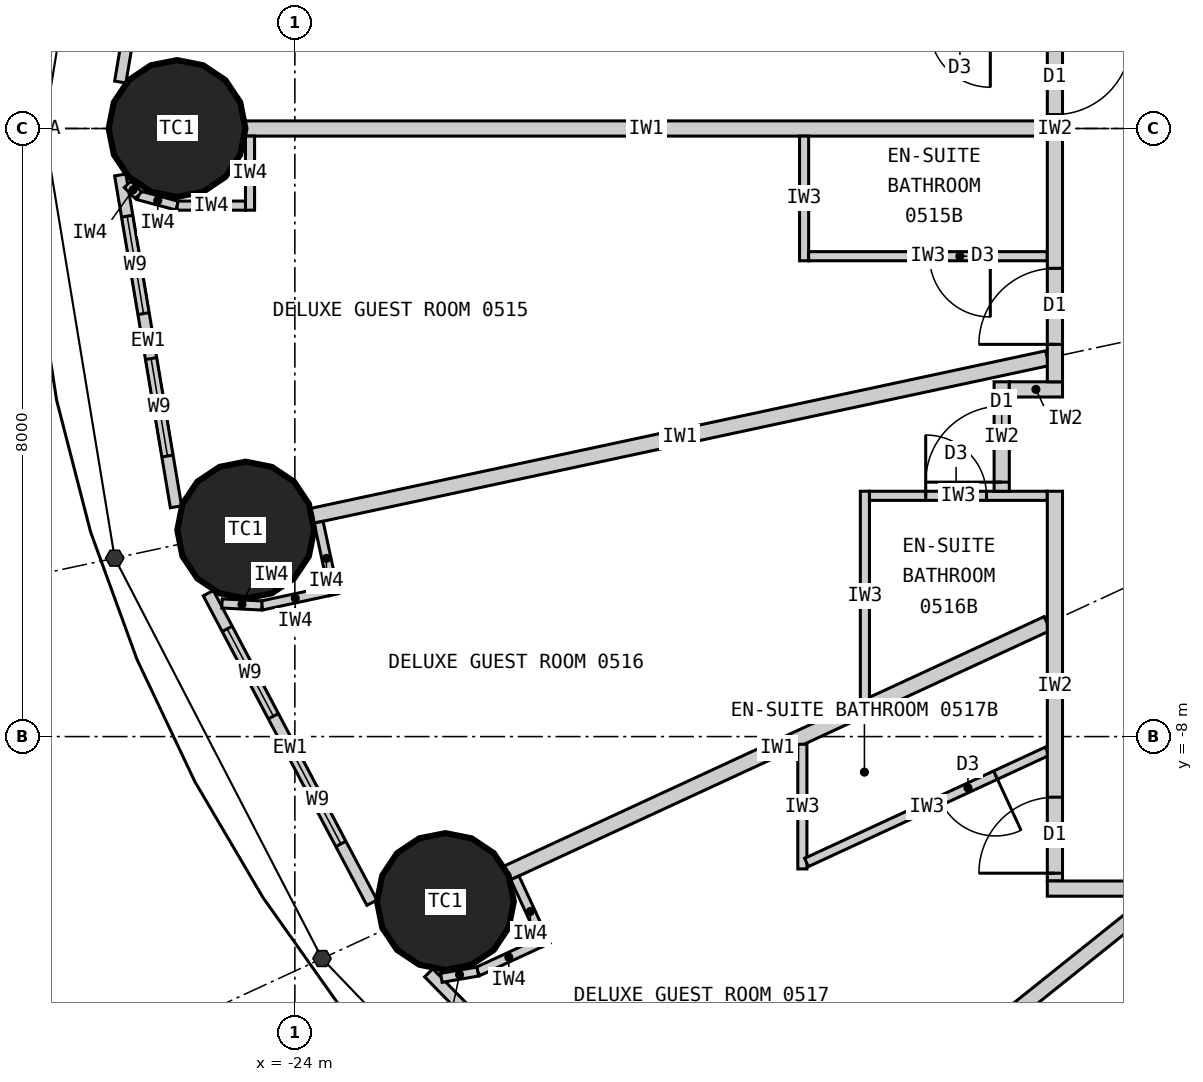
"""IFC4 building model, lengths in metres.
Left out: names, types, materials, properties, quantities, classifications, styles, units other than length and angle.
Written with IfcOpenShell. Run it as: python <this file> out.ifc"""

import sys

from ifc_helpers import new_model, si_unit, direction, frame, frame_2d, origin, origin_2d, place, context, subcontext, project, spatial, rectangle, circle, extrude, element, fill, save


model = new_model("IFC4")
c1 = context("Model", 3, precision=1e-05, world=origin(), true_north=direction((0.0, 1.0)))
c2 = subcontext(c1, "Body", "Model", "MODEL_VIEW")
j1 = project(units=[si_unit("LENGTHUNIT", "METRE"), si_unit("PLANEANGLEUNIT", "RADIAN")], contexts=[c1])
p1 = place(None, origin())
s1 = spatial("IfcSite", under=j1, at=p1, CompositionType="ELEMENT")
p2 = place(p1, origin())
s2 = spatial("IfcBuilding", under=s1, at=p2, CompositionType="ELEMENT")
p3 = place(p2, frame((0.0, 0.0, 29.4)))
s3 = spatial("IfcBuildingStorey", under=s2, at=p3, CompositionType="ELEMENT", Elevation=29.4)
for number, where, z_axis, x_axis in (
    (1, (-25.55, 0.0, 0.0), (0.0, 0.0, 1.0), (1.0, 0.0, 0.0)),
    (2, (-24.647, -5.283, 0.0), (0.0, 0.0, 1.0), (1.0, 0.0, 0.0)),
    (3, (-22.019, -10.17, 0.0), (0.0, 0.0, 1.0), (1.0, 0.0, 0.0)),
):
    element("IfcColumn", number, at=place(p3, frame(where, z_axis=z_axis, x_axis=x_axis)), inside=s3, PredefinedType="COLUMN", context=c2, shape_type="SweptSolid", body=[
        extrude(circle(Radius=0.9, at=origin_2d()), origin(), (0.0, 0.0, 1.0), 3.3),
    ])
p4 = place(p3, frame((-25.564, 4.978, 0.0), z_axis=(0.0, 0.0, 1.0), x_axis=(-0.165641751141, -0.986185991727, 0.0)))
e4 = element("IfcWall", 4, at=p4, inside=s3, PredefinedType="ELEMENTEDWALL", context=c2, shape_type="SweptSolid", body=[
    extrude(rectangle(XDim=4.428, YDim=0.15, at=frame_2d((2.214, 0.0))), origin(), (0.0, 0.0, 1.0), 3.12),
])
p5 = place(p4, frame((0.678, 0.0, 0.9)))
e5 = element("IfcOpeningElement", 5, at=p5, cuts=e4, PredefinedType="OPENING", context=c2, shape_type="SweptSolid", body=[
    extrude(rectangle(XDim=1.3, YDim=1.9, at=frame_2d((0.65, 0.95))), frame((0.0, 0.085, 0.0), z_axis=(0.0, -1.0, 0.0), x_axis=(1.0, 0.0, 0.0)), (0.0, 0.0, 1.0), 0.17),
])
p6 = place(p4, frame((2.578, 0.0, 0.9)))
e6 = element("IfcOpeningElement", 6, at=p6, cuts=e4, PredefinedType="OPENING", context=c2, shape_type="SweptSolid", body=[
    extrude(rectangle(XDim=1.3, YDim=1.9, at=frame_2d((0.65, 0.95))), frame((0.0, 0.085, 0.0), z_axis=(0.0, -1.0, 0.0), x_axis=(1.0, 0.0, 0.0)), (0.0, 0.0, 1.0), 0.17),
])
p7 = place(p3, frame((-26.297, -0.611, 0.0), z_axis=(0.0, 0.0, 1.0), x_axis=(0.165641751141, -0.986185991727, 0.0)))
e7 = element("IfcWall", 7, at=p7, inside=s3, PredefinedType="ELEMENTEDWALL", context=c2, shape_type="SweptSolid", body=[
    extrude(rectangle(XDim=4.428, YDim=0.15, at=frame_2d((2.214, 0.0))), origin(), (0.0, 0.0, 1.0), 3.12),
])
p8 = place(p7, frame((0.55, 0.0, 0.9)))
e8 = element("IfcOpeningElement", 8, at=p8, cuts=e7, PredefinedType="OPENING", context=c2, shape_type="SweptSolid", body=[
    extrude(rectangle(XDim=1.3, YDim=1.9, at=frame_2d((0.65, 0.95))), frame((0.0, 0.085, 0.0), z_axis=(0.0, -1.0, 0.0), x_axis=(1.0, 0.0, 0.0)), (0.0, 0.0, 1.0), 0.17),
])
p9 = place(p7, frame((2.45, 0.0, 0.9)))
e9 = element("IfcOpeningElement", 9, at=p9, cuts=e7, PredefinedType="OPENING", context=c2, shape_type="SweptSolid", body=[
    extrude(rectangle(XDim=1.3, YDim=1.9, at=frame_2d((0.65, 0.95))), frame((0.0, 0.085, 0.0), z_axis=(0.0, -1.0, 0.0), x_axis=(1.0, 0.0, 0.0)), (0.0, 0.0, 1.0), 0.17),
])
p10 = place(p3, frame((-25.139, -6.113, 0.0), z_axis=(0.0, 0.0, 1.0), x_axis=(0.467303182954, -0.884097129959, 0.0)))
e10 = element("IfcWall", 10, at=p10, inside=s3, PredefinedType="ELEMENTEDWALL", context=c2, shape_type="SweptSolid", body=[
    extrude(rectangle(XDim=4.606, YDim=0.15, at=frame_2d((2.303, 0.0))), origin(), (0.0, 0.0, 1.0), 3.12),
])
p11 = place(p10, frame((0.531, 0.0, 0.9)))
e11 = element("IfcOpeningElement", 11, at=p11, cuts=e10, PredefinedType="OPENING", context=c2, shape_type="SweptSolid", body=[
    extrude(rectangle(XDim=1.3, YDim=1.9, at=frame_2d((0.65, 0.95))), frame((0.0, 0.085, 0.0), z_axis=(0.0, -1.0, 0.0), x_axis=(1.0, 0.0, 0.0)), (0.0, 0.0, 1.0), 0.17),
])
p12 = place(p10, frame((2.432, 0.0, 0.9)))
e12 = element("IfcOpeningElement", 12, at=p12, cuts=e10, PredefinedType="OPENING", context=c2, shape_type="SweptSolid", body=[
    extrude(rectangle(XDim=1.3, YDim=1.9, at=frame_2d((0.65, 0.95))), frame((0.0, 0.085, 0.0), z_axis=(0.0, -1.0, 0.0), x_axis=(1.0, 0.0, 0.0)), (0.0, 0.0, 1.0), 0.17),
])
p13 = place(p3, frame((-22.239, -11.108, 0.0), z_axis=(0.0, 0.0, 1.0), x_axis=(0.699612594083, -0.714522370679, 0.0)))
e13 = element("IfcWall", 13, at=p13, inside=s3, PredefinedType="ELEMENTEDWALL", context=c2, shape_type="SweptSolid", body=[
    extrude(rectangle(XDim=4.896, YDim=0.15, at=frame_2d((2.448, 0.0))), origin(), (0.0, 0.0, 1.0), 3.12),
])
p14 = place(p13, frame((0.619, 0.0, 0.9)))
e14 = element("IfcOpeningElement", 14, at=p14, cuts=e13, PredefinedType="OPENING", context=c2, shape_type="SweptSolid", body=[
    extrude(rectangle(XDim=1.3, YDim=1.9, at=frame_2d((0.65, 0.95))), frame((0.0, 0.085, 0.0), z_axis=(0.0, -1.0, 0.0), x_axis=(1.0, 0.0, 0.0)), (0.0, 0.0, 1.0), 0.17),
])
p15 = place(p13, frame((2.519, 0.0, 0.9)))
e15 = element("IfcOpeningElement", 15, at=p15, cuts=e13, PredefinedType="OPENING", context=c2, shape_type="SweptSolid", body=[
    extrude(rectangle(XDim=1.3, YDim=1.9, at=frame_2d((0.65, 0.95))), frame((0.0, 0.085, 0.0), z_axis=(0.0, -1.0, 0.0), x_axis=(1.0, 0.0, 0.0)), (0.0, 0.0, 1.0), 0.17),
])
p16 = place(p3, frame((-14.1, 0.0, 0.0), z_axis=(0.0, 0.0, 1.0), x_axis=(-1.0, 0.0, 0.0)))
e16 = element("IfcWall", 16, at=p16, inside=s3, PredefinedType="PARTITIONING", context=c2, shape_type="SweptSolid", body=[
    extrude(rectangle(XDim=10.55, YDim=0.2, at=frame_2d((5.275, 0.0))), origin(), (0.0, 0.0, 1.0), 2.27),
])
p17 = place(p3, frame((-14.1, -3.022, 0.0), z_axis=(0.0, 0.0, 1.0), x_axis=(-0.977786510688, -0.209603290805, 0.0)))
e17 = element("IfcWall", 17, at=p17, inside=s3, PredefinedType="PARTITIONING", context=c2, shape_type="SweptSolid", body=[
    extrude(rectangle(XDim=9.887, YDim=0.2, at=frame_2d((4.943, 0.0))), origin(), (0.0, 0.0, 1.0), 2.32),
])
p18 = place(p3, frame((-14.1, -6.512, 0.0), z_axis=(0.0, 0.0, 1.0), x_axis=(-0.907842433118, -0.41931147925, 0.0)))
e18 = element("IfcWall", 18, at=p18, inside=s3, PredefinedType="PARTITIONING", context=c2, shape_type="SweptSolid", body=[
    extrude(rectangle(XDim=7.823, YDim=0.2, at=frame_2d((3.912, 0.0))), origin(), (0.0, 0.0, 1.0), 2.32),
])
p19 = place(p3, frame((-12.625, -10.1, 0.0), z_axis=(0.0, 0.0, 1.0), x_axis=(-0.780872884676, -0.624689953479, 0.0)))
e19 = element("IfcWall", 19, at=p19, inside=s3, PredefinedType="PARTITIONING", context=c2, shape_type="SweptSolid", body=[
    extrude(rectangle(XDim=5.845, YDim=0.2, at=frame_2d((2.922, 0.0))), origin(), (0.0, 0.0, 1.0), 2.32),
])
p20 = place(p3, frame((-17.3, -0.1, 0.0), z_axis=(0.0, 0.0, 1.0), x_axis=(0.0, -1.0, 0.0)))
e20 = element("IfcWall", 20, at=p20, inside=s3, PredefinedType="PARTITIONING", context=c2, shape_type="SweptSolid", body=[
    extrude(rectangle(XDim=1.64, YDim=0.12, at=frame_2d((0.82, 0.0))), origin(), (0.0, 0.0, 1.0), 3.12),
])
p21 = place(p3, frame((-14.1, -1.68, 0.0), z_axis=(0.0, 0.0, 1.0), x_axis=(-1.0, 0.0, 0.0)))
e21 = element("IfcWall", 21, at=p21, inside=s3, PredefinedType="PARTITIONING", context=c2, shape_type="SweptSolid", body=[
    extrude(rectangle(XDim=3.14, YDim=0.12, at=frame_2d((1.57, 0.0))), origin(), (0.0, 0.0, 1.0), 3.12),
])
p22 = place(p21, frame((0.75, 0.0, 0.0)))
e22 = element("IfcOpeningElement", 22, at=p22, cuts=e21, PredefinedType="OPENING", context=c2, shape_type="SweptSolid", body=[
    extrude(rectangle(XDim=0.8, YDim=2.1, at=frame_2d((0.4, 1.05))), frame((0.0, 0.07, 0.0), z_axis=(0.0, -1.0, 0.0), x_axis=(1.0, 0.0, 0.0)), (0.0, 0.0, 1.0), 0.14),
])
p23 = place(p3, frame((-16.5, -7.521, 0.0), z_axis=(0.0, 0.0, 1.0), x_axis=(0.0, 1.0, 0.0)))
e23 = element("IfcWall", 23, at=p23, inside=s3, PredefinedType="PARTITIONING", context=c2, shape_type="SweptSolid", body=[
    extrude(rectangle(XDim=2.749, YDim=0.12, at=frame_2d((1.374, 0.0))), origin(), (0.0, 0.0, 1.0), 3.12),
])
p24 = place(p3, frame((-14.1, -4.833, 0.0), z_axis=(0.0, 0.0, 1.0), x_axis=(-1.0, 0.0, 0.0)))
e24 = element("IfcWall", 24, at=p24, inside=s3, PredefinedType="PARTITIONING", context=c2, shape_type="SweptSolid", body=[
    extrude(rectangle(XDim=2.34, YDim=0.12, at=frame_2d((1.17, 0.0))), origin(), (0.0, 0.0, 1.0), 3.12),
])
p25 = place(p24, frame((0.8, 0.0, 0.0)))
e25 = element("IfcOpeningElement", 25, at=p25, cuts=e24, PredefinedType="OPENING", context=c2, shape_type="SweptSolid", body=[
    extrude(rectangle(XDim=0.8, YDim=2.1, at=frame_2d((0.4, 1.05))), frame((0.0, 0.07, 0.0), z_axis=(0.0, -1.0, 0.0), x_axis=(1.0, 0.0, 0.0)), (0.0, 0.0, 1.0), 0.14),
])
p26 = place(p3, frame((-17.323, -8.101, 0.0), z_axis=(0.0, 0.0, 1.0), x_axis=(0.0, -1.0, 0.0)))
e26 = element("IfcWall", 26, at=p26, inside=s3, PredefinedType="PARTITIONING", context=c2, shape_type="SweptSolid", body=[
    extrude(rectangle(XDim=1.64, YDim=0.12, at=frame_2d((0.82, 0.0))), origin(), (0.0, 0.0, 1.0), 3.12),
])
p27 = place(p3, frame((-14.1, -8.193, 0.0), z_axis=(0.0, 0.0, 1.0), x_axis=(-0.907836493557, -0.419324338628, 0.0)))
e27 = element("IfcWall", 27, at=p27, inside=s3, PredefinedType="PARTITIONING", context=c2, shape_type="SweptSolid", body=[
    extrude(rectangle(XDim=3.49, YDim=0.12, at=frame_2d((1.745, 0.0))), origin(), (0.0, 0.0, 1.0), 3.12),
])
p28 = place(p27, frame((0.75, 0.0, 0.0)))
e28 = element("IfcOpeningElement", 28, at=p28, cuts=e27, PredefinedType="OPENING", context=c2, shape_type="SweptSolid", body=[
    extrude(rectangle(XDim=0.8, YDim=2.1, at=frame_2d((0.4, 1.05))), frame((0.0, 0.07, 0.0), z_axis=(0.0, -1.0, 0.0), x_axis=(1.0, 0.0, 0.0)), (0.0, 0.0, 1.0), 0.14),
])
p29 = place(p3, frame((-14.7, -3.333, 0.0), z_axis=(0.0, 0.0, 1.0), x_axis=(0.0, -1.0, 0.0)))
e29 = element("IfcWall", 29, at=p29, inside=s3, PredefinedType="PARTITIONING", context=c2, shape_type="SweptSolid", body=[
    extrude(rectangle(XDim=1.44, YDim=0.2, at=frame_2d((0.72, 0.0))), origin(), (0.0, 0.0, 1.0), 3.12),
])
p30 = place(p29, frame((0.32, 0.0, 0.0)))
e30 = element("IfcOpeningElement", 30, at=p30, cuts=e29, PredefinedType="OPENING", context=c2, shape_type="SweptSolid", body=[
    extrude(rectangle(XDim=1.0, YDim=2.2, at=frame_2d((0.5, 1.1))), frame((0.0, 0.11, 0.0), z_axis=(0.0, -1.0, 0.0), x_axis=(1.0, 0.0, 0.0)), (0.0, 0.0, 1.0), 0.22),
])
p31 = place(p3, frame((-13.9, -3.433, 0.0), z_axis=(0.0, 0.0, 1.0), x_axis=(-1.0, 0.0, 0.0)))
e31 = element("IfcWall", 31, at=p31, inside=s3, PredefinedType="PARTITIONING", context=c2, shape_type="SweptSolid", body=[
    extrude(rectangle(XDim=0.7, YDim=0.2, at=frame_2d((0.35, 0.0))), origin(), (0.0, 0.0, 1.0), 2.32),
])
p32 = place(p3, frame((-14.0, 3.333, 0.0), z_axis=(0.0, 0.0, 1.0), x_axis=(0.0, -1.0, 0.0)))
e32 = element("IfcWall", 32, at=p32, inside=s3, PredefinedType="PARTITIONING", context=c2, shape_type="SweptSolid", body=[
    extrude(rectangle(XDim=6.665, YDim=0.2, at=frame_2d((3.333, 0.0))), origin(), (0.0, 0.0, 1.0), 3.12),
])
p33 = place(p32, frame((2.15, 0.0, 0.0)))
e33 = element("IfcOpeningElement", 33, at=p33, cuts=e32, PredefinedType="OPENING", context=c2, shape_type="SweptSolid", body=[
    extrude(rectangle(XDim=1.0, YDim=2.2, at=frame_2d((0.5, 1.1))), frame((0.0, 0.11, 0.0), z_axis=(0.0, -1.0, 0.0), x_axis=(1.0, 0.0, 0.0)), (0.0, 0.0, 1.0), 0.22),
])
p34 = place(p32, frame((5.173, 0.0, 0.0)))
e34 = element("IfcOpeningElement", 34, at=p34, cuts=e32, PredefinedType="OPENING", context=c2, shape_type="SweptSolid", body=[
    extrude(rectangle(XDim=1.0, YDim=2.2, at=frame_2d((0.5, 1.1))), frame((0.0, 0.11, 0.0), z_axis=(0.0, -1.0, 0.0), x_axis=(1.0, 0.0, 0.0)), (0.0, 0.0, 1.0), 0.22),
])
p35 = place(p3, frame((-14.0, -4.772, 0.0), z_axis=(0.0, 0.0, 1.0), x_axis=(0.0, -1.0, 0.0)))
e35 = element("IfcWall", 35, at=p35, inside=s3, PredefinedType="PARTITIONING", context=c2, shape_type="SweptSolid", body=[
    extrude(rectangle(XDim=5.127, YDim=0.2, at=frame_2d((2.564, 0.0))), origin(), (0.0, 0.0, 1.0), 3.12),
])
p36 = place(p35, frame((4.025, 0.0, 0.0)))
e36 = element("IfcOpeningElement", 36, at=p36, cuts=e35, PredefinedType="OPENING", context=c2, shape_type="SweptSolid", body=[
    extrude(rectangle(XDim=1.0, YDim=2.2, at=frame_2d((0.5, 1.1))), frame((0.0, 0.11, 0.0), z_axis=(0.0, -1.0, 0.0), x_axis=(1.0, 0.0, 0.0)), (0.0, 0.0, 1.0), 0.22),
])
p37 = place(p3, frame((-3.499, -10.0, 0.0), z_axis=(0.0, 0.0, 1.0), x_axis=(-1.0, 0.0, 0.0)))
e37 = element("IfcWall", 37, at=p37, inside=s3, PredefinedType="PARTITIONING", context=c2, shape_type="SweptSolid", body=[
    extrude(rectangle(XDim=10.602, YDim=0.2, at=frame_2d((5.301, 0.0))), origin(), (0.0, 0.0, 1.0), 3.12),
])
p38 = place(p37, frame((4.846, 0.0, 0.0)))
e38 = element("IfcOpeningElement", 38, at=p38, cuts=e37, PredefinedType="OPENING", context=c2, shape_type="SweptSolid", body=[
    extrude(rectangle(XDim=1.0, YDim=2.2, at=frame_2d((0.5, 1.1))), frame((0.0, 0.11, 0.0), z_axis=(0.0, -1.0, 0.0), x_axis=(1.0, 0.0, 0.0)), (0.0, 0.0, 1.0), 0.22),
])
p39 = place(p3, frame((-24.59, -0.1, 0.0), z_axis=(0.0, 0.0, 1.0), x_axis=(0.0, -1.0, 0.0)))
e39 = element("IfcWall", 39, at=p39, inside=s3, PredefinedType="PARTITIONING", context=c2, shape_type="SweptSolid", body=[
    extrude(rectangle(XDim=0.974, YDim=0.12, at=frame_2d((0.487, 0.0))), origin(), (0.0, 0.0, 1.0), 3.12),
])
p40 = place(p3, frame((-24.65, -1.015, 0.0), z_axis=(0.0, 0.0, 1.0), x_axis=(-1.0, 0.0, 0.0)))
e40 = element("IfcWall", 40, at=p40, inside=s3, PredefinedType="PARTITIONING", context=c2, shape_type="SweptSolid", body=[
    extrude(rectangle(XDim=0.9, YDim=0.12, at=frame_2d((0.45, 0.0))), origin(), (0.0, 0.0, 1.0), 3.12),
])
p41 = place(p3, frame((-25.55, -1.015, 0.0), z_axis=(0.0, 0.0, 1.0), x_axis=(-0.96590239779, 0.258906465625, 0.0)))
e41 = element("IfcWall", 41, at=p41, inside=s3, PredefinedType="PARTITIONING", context=c2, shape_type="SweptSolid", body=[
    extrude(rectangle(XDim=0.525, YDim=0.12, at=frame_2d((0.263, 0.0))), origin(), (0.0, 0.0, 1.0), 3.12),
])
p42 = place(p3, frame((-26.057, -0.879, 0.0), z_axis=(0.0, 0.0, 1.0), x_axis=(-0.707106781187, 0.707106781187, 0.0)))
e42 = element("IfcWall", 42, at=p42, inside=s3, PredefinedType="PARTITIONING", context=c2, shape_type="SweptSolid", body=[
    extrude(rectangle(XDim=0.204, YDim=0.12, at=frame_2d((0.102, 0.0))), origin(), (0.0, 0.0, 1.0), 3.12),
])
p43 = place(p3, frame((-23.687, -5.18, 0.0), z_axis=(0.0, 0.0, 1.0), x_axis=(0.209443540911, -0.977820741839, 0.0)))
e43 = element("IfcWall", 43, at=p43, inside=s3, PredefinedType="PARTITIONING", context=c2, shape_type="SweptSolid", body=[
    extrude(rectangle(XDim=0.975, YDim=0.12, at=frame_2d((0.487, 0.0))), origin(), (0.0, 0.0, 1.0), 3.12),
])
p44 = place(p3, frame((-23.554, -6.087, 0.0), z_axis=(0.0, 0.0, 1.0), x_axis=(-0.977762694187, -0.209714362543, 0.0)))
e44 = element("IfcWall", 44, at=p44, inside=s3, PredefinedType="PARTITIONING", context=c2, shape_type="SweptSolid", body=[
    extrude(rectangle(XDim=0.9, YDim=0.12, at=frame_2d((0.45, 0.0))), origin(), (0.0, 0.0, 1.0), 3.12),
])
p45 = place(p3, frame((-24.434, -6.275, 0.0), z_axis=(0.0, 0.0, 1.0), x_axis=(-0.998714959873, 0.050679669751, 0.0)))
e45 = element("IfcWall", 45, at=p45, inside=s3, PredefinedType="PARTITIONING", context=c2, shape_type="SweptSolid", body=[
    extrude(rectangle(XDim=0.525, YDim=0.12, at=frame_2d((0.263, 0.0))), origin(), (0.0, 0.0, 1.0), 3.12),
])
p46 = place(p3, frame((-21.106, -9.858, 0.0), z_axis=(0.0, 0.0, 1.0), x_axis=(0.419344098106, -0.907827366509, 0.0)))
e46 = element("IfcWall", 46, at=p46, inside=s3, PredefinedType="PARTITIONING", context=c2, shape_type="SweptSolid", body=[
    extrude(rectangle(XDim=0.975, YDim=0.12, at=frame_2d((0.487, 0.0))), origin(), (0.0, 0.0, 1.0), 3.12),
])
p47 = place(p3, frame((-20.777, -10.714, 0.0), z_axis=(0.0, 0.0, 1.0), x_axis=(-0.907832324198, -0.419333365166, 0.0)))
e47 = element("IfcWall", 47, at=p47, inside=s3, PredefinedType="PARTITIONING", context=c2, shape_type="SweptSolid", body=[
    extrude(rectangle(XDim=0.9, YDim=0.12, at=frame_2d((0.45, 0.0))), origin(), (0.0, 0.0, 1.0), 3.12),
])
p48 = place(p3, frame((-21.594, -11.091, 0.0), z_axis=(0.0, 0.0, 1.0), x_axis=(-0.985483306792, -0.169772353566, 0.0)))
e48 = element("IfcWall", 48, at=p48, inside=s3, PredefinedType="PARTITIONING", context=c2, shape_type="SweptSolid", body=[
    extrude(rectangle(XDim=0.486, YDim=0.12, at=frame_2d((0.243, 0.0))), origin(), (0.0, 0.0, 1.0), 3.12),
])
p49 = place(p8, origin())
e49 = element("IfcWindow", 49, at=p49, inside=s3, PartitioningType="SINGLE_PANEL", PredefinedType="WINDOW", context=c2, shape_type="SweptSolid", body=[
    extrude(rectangle(XDim=1.3, YDim=1.9, at=frame_2d((0.65, 0.95))), frame((0.0, 0.03, 0.0), z_axis=(0.0, -1.0, 0.0), x_axis=(1.0, 0.0, 0.0)), (0.0, 0.0, 1.0), 0.06),
])
fill(e8, e49)
p50 = place(p9, origin())
e50 = element("IfcWindow", 50, at=p50, inside=s3, PartitioningType="SINGLE_PANEL", PredefinedType="WINDOW", context=c2, shape_type="SweptSolid", body=[
    extrude(rectangle(XDim=1.3, YDim=1.9, at=frame_2d((0.65, 0.95))), frame((0.0, 0.03, 0.0), z_axis=(0.0, -1.0, 0.0), x_axis=(1.0, 0.0, 0.0)), (0.0, 0.0, 1.0), 0.06),
])
fill(e9, e50)
p51 = place(p11, origin())
e51 = element("IfcWindow", 51, at=p51, inside=s3, PartitioningType="SINGLE_PANEL", PredefinedType="WINDOW", context=c2, shape_type="SweptSolid", body=[
    extrude(rectangle(XDim=1.3, YDim=1.9, at=frame_2d((0.65, 0.95))), frame((0.0, 0.03, 0.0), z_axis=(0.0, -1.0, 0.0), x_axis=(1.0, 0.0, 0.0)), (0.0, 0.0, 1.0), 0.06),
])
fill(e11, e51)
p52 = place(p12, origin())
e52 = element("IfcWindow", 52, at=p52, inside=s3, PartitioningType="SINGLE_PANEL", PredefinedType="WINDOW", context=c2, shape_type="SweptSolid", body=[
    extrude(rectangle(XDim=1.3, YDim=1.9, at=frame_2d((0.65, 0.95))), frame((0.0, 0.03, 0.0), z_axis=(0.0, -1.0, 0.0), x_axis=(1.0, 0.0, 0.0)), (0.0, 0.0, 1.0), 0.06),
])
fill(e12, e52)
p53 = place(p33, origin())
e53 = element("IfcDoor", 53, at=p53, inside=s3, OperationType="SINGLE_SWING_LEFT", PredefinedType="DOOR", context=c2, shape_type="SweptSolid", body=[
    extrude(rectangle(XDim=1.0, YDim=2.2, at=frame_2d((0.5, 1.1))), frame((0.0, 0.025, 0.0), z_axis=(0.0, -1.0, 0.0), x_axis=(1.0, 0.0, 0.0)), (0.0, 0.0, 1.0), 0.05),
])
fill(e33, e53)
p54 = place(p22, origin())
e54 = element("IfcDoor", 54, at=p54, inside=s3, OperationType="SINGLE_SWING_LEFT", PredefinedType="DOOR", context=c2, shape_type="SweptSolid", body=[
    extrude(rectangle(XDim=0.8, YDim=2.1, at=frame_2d((0.4, 1.05))), frame((0.0, 0.025, 0.0), z_axis=(0.0, -1.0, 0.0), x_axis=(1.0, 0.0, 0.0)), (0.0, 0.0, 1.0), 0.05),
])
fill(e22, e54)
p55 = place(p34, origin())
e55 = element("IfcDoor", 55, at=p55, inside=s3, OperationType="SINGLE_SWING_RIGHT", PredefinedType="DOOR", context=c2, shape_type="SweptSolid", body=[
    extrude(rectangle(XDim=1.0, YDim=2.2, at=frame_2d((0.5, 1.1))), frame((0.0, 0.025, 0.0), z_axis=(0.0, -1.0, 0.0), x_axis=(1.0, 0.0, 0.0)), (0.0, 0.0, 1.0), 0.05),
])
fill(e34, e55)
p56 = place(p25, origin())
e56 = element("IfcDoor", 56, at=p56, inside=s3, OperationType="SINGLE_SWING_RIGHT", PredefinedType="DOOR", context=c2, shape_type="SweptSolid", body=[
    extrude(rectangle(XDim=0.8, YDim=2.1, at=frame_2d((0.4, 1.05))), frame((0.0, 0.025, 0.0), z_axis=(0.0, -1.0, 0.0), x_axis=(1.0, 0.0, 0.0)), (0.0, 0.0, 1.0), 0.05),
])
fill(e25, e56)
p57 = place(p30, origin())
e57 = element("IfcDoor", 57, at=p57, inside=s3, OperationType="SINGLE_SWING_RIGHT", PredefinedType="DOOR", context=c2, shape_type="SweptSolid", body=[
    extrude(rectangle(XDim=1.0, YDim=2.2, at=frame_2d((0.5, 1.1))), frame((0.0, 0.025, 0.0), z_axis=(0.0, -1.0, 0.0), x_axis=(1.0, 0.0, 0.0)), (0.0, 0.0, 1.0), 0.05),
])
fill(e30, e57)
p58 = place(p28, origin())
e58 = element("IfcDoor", 58, at=p58, inside=s3, OperationType="SINGLE_SWING_LEFT", PredefinedType="DOOR", context=c2, shape_type="SweptSolid", body=[
    extrude(rectangle(XDim=0.8, YDim=2.1, at=frame_2d((0.4, 1.05))), frame((0.0, 0.025, 0.0), z_axis=(0.0, -1.0, 0.0), x_axis=(1.0, 0.0, 0.0)), (0.0, 0.0, 1.0), 0.05),
])
fill(e28, e58)
p59 = place(p36, origin())
e59 = element("IfcDoor", 59, at=p59, inside=s3, OperationType="SINGLE_SWING_RIGHT", PredefinedType="DOOR", context=c2, shape_type="SweptSolid", body=[
    extrude(rectangle(XDim=1.0, YDim=2.2, at=frame_2d((0.5, 1.1))), frame((0.0, 0.025, 0.0), z_axis=(0.0, -1.0, 0.0), x_axis=(1.0, 0.0, 0.0)), (0.0, 0.0, 1.0), 0.05),
])
fill(e36, e59)
save(model, sys.argv[1])
